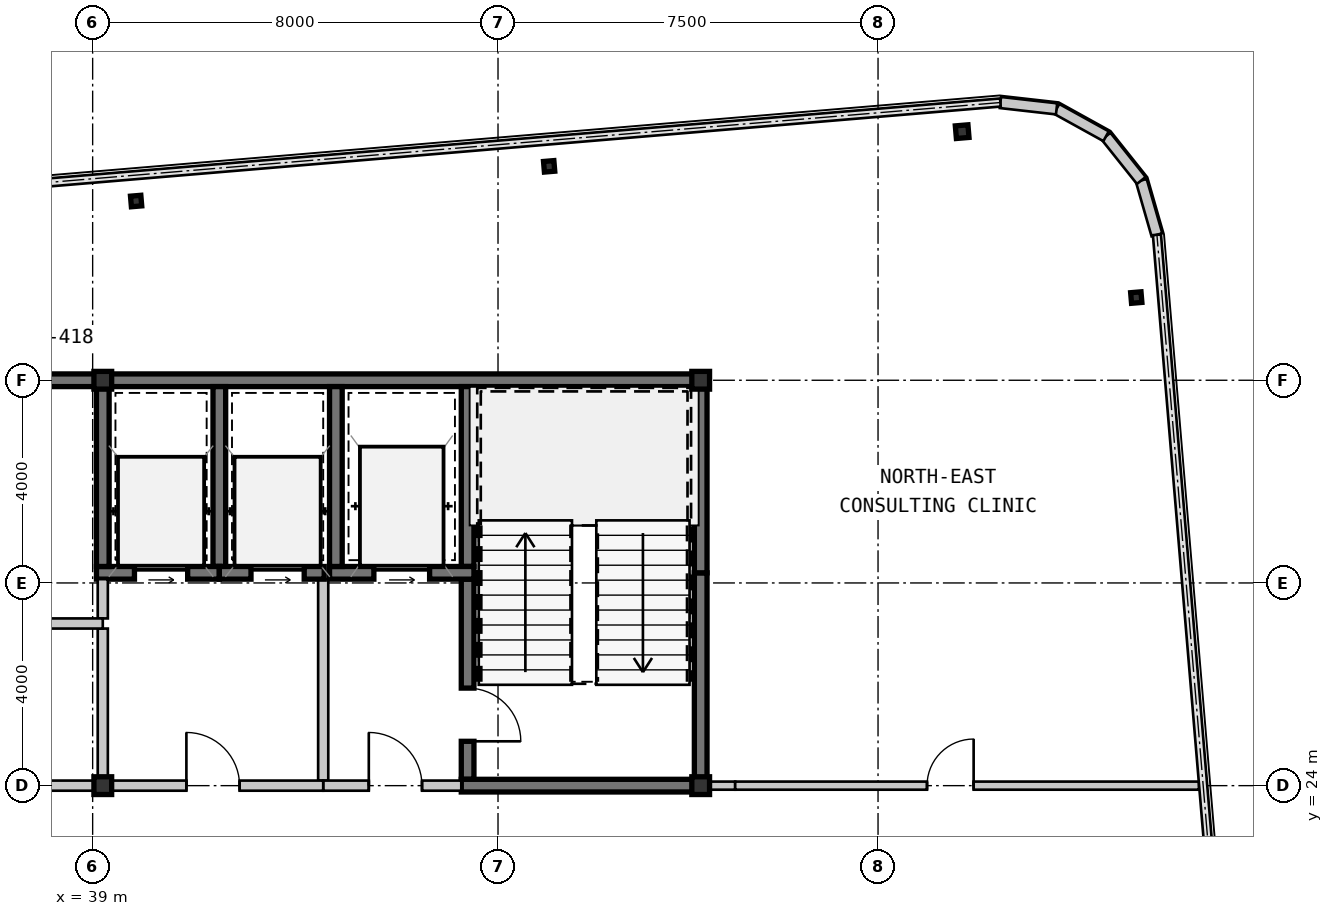
"""IFC4 building model, lengths in metres.
Left out: names, types, materials, properties, quantities, classifications, styles, units other than length and angle.
Written with IfcOpenShell. Run it as: python <this file> out.ifc"""

import sys

from ifc_helpers import new_model, si_unit, direction, frame, frame_2d, origin, origin_2d, place, context, subcontext, project, spatial, rectangle, hollow_rectangle, i_section, extrude, source, transform, mapped, element, fill, save


model = new_model("IFC4")
c1 = context("Model", 3, precision=1e-05, world=origin(), true_north=direction((0.0, 1.0)))
c2 = subcontext(c1, "Body", "Model", "MODEL_VIEW")
j1 = project(units=[si_unit("LENGTHUNIT", "METRE"), si_unit("PLANEANGLEUNIT", "RADIAN")], contexts=[c1])
p1 = place(None, origin())
s1 = spatial("IfcSite", under=j1, at=p1, CompositionType="ELEMENT")
p2 = place(p1, origin())
s2 = spatial("IfcBuilding", under=s1, at=p2, CompositionType="ELEMENT")
p3 = place(p2, frame((0.0, 0.0, 191.45)))
s3 = spatial("IfcBuildingStorey", under=s2, at=p3, CompositionType="ELEMENT", Elevation=191.45)
m1 = source(origin(), c2, "Body", "SweptSolid", [
    extrude(hollow_rectangle(XDim=0.35, YDim=0.35, WallThickness=0.016, at=origin_2d()), origin(), (0.0, 0.0, 1.0), 3.15),
])
for number, where, z_axis, x_axis in (
    (1, (39.2, 24.0, 0.0), (0.0, 0.0, 1.0), (1.0, 0.0, 0.0)),
    (2, (51.0, 24.0, 0.0), (0.0, 0.0, 1.0), (1.0, 0.0, 0.0)),
    (3, (39.2, 32.0, 0.0), (0.0, 0.0, 1.0), (1.0, 0.0, 0.0)),
    (4, (51.0, 32.0, 0.0), (0.0, 0.0, 1.0), (1.0, 0.0, 0.0)),
):
    element("IfcColumn", number, at=place(p3, frame(where, z_axis=z_axis, x_axis=x_axis)), inside=s3, PredefinedType="COLUMN", context=c2, shape_type="MappedRepresentation", body=[
        mapped(m1, transform((0.0, 0.0, 0.0), scale=1.0)),
    ])
m2 = source(origin(), c2, "Body", "SweptSolid", [
    extrude(i_section(OverallWidth=0.205, OverallDepth=0.21, WebThickness=0.009, FlangeThickness=0.014, at=origin_2d()), origin(), (0.0, 0.0, 1.0), 3.15),
])
for number, where, z_axis, x_axis in (
    (5, (39.858, 35.537, 0.0), (0.0, 0.0, 1.0), (0.996, 0.084, 0.0)),
    (6, (48.009, 36.221, 0.0), (0.0, 0.0, 1.0), (0.996, 0.084, 0.0)),
):
    element("IfcColumn", number, at=place(p3, frame(where, z_axis=z_axis, x_axis=x_axis)), inside=s3, PredefinedType="COLUMN", context=c2, shape_type="MappedRepresentation", body=[
        mapped(m2, transform((0.0, 0.0, 0.0), scale=1.0)),
    ])
m3 = source(origin(), c2, "Body", "SweptSolid", [
    extrude(hollow_rectangle(XDim=0.25, YDim=0.25, WallThickness=0.01, at=origin_2d()), origin(), (0.0, 0.0, 1.0), 3.15),
])
p4 = place(p3, frame((56.16, 36.906, 0.0), z_axis=(0.0, 0.0, 1.0), x_axis=(0.99649285925, 0.083677843332, 0.0)))
e7 = element("IfcColumn", 7, at=p4, inside=s3, PredefinedType="COLUMN", context=c2, shape_type="MappedRepresentation", body=[
    mapped(m3, transform((0.0, 0.0, 0.0), scale=1.0)),
])
p5 = place(p3, frame((59.596, 33.632, 0.0), z_axis=(0.0, 0.0, 1.0), x_axis=(0.99649285925, 0.083677843332, 0.0)))
e8 = element("IfcColumn", 8, at=p5, inside=s3, PredefinedType="COLUMN", context=c2, shape_type="MappedRepresentation", body=[
    mapped(m2, transform((0.0, 0.0, 0.0), scale=1.0)),
])
m4 = source(origin(), c2, "Body", "SweptSolid", [
    extrude(rectangle(XDim=1.116, YDim=0.22, at=frame_2d((0.558, 0.0))), origin(), (0.0, 0.0, 1.0), 2.93),
])
for number, where, z_axis, x_axis in (
    (9, (60.004, 34.87, 0.0), (0.0, 0.0, 1.0), (-0.277, 0.961, 0.0)),
    (10, (59.696, 35.943, 0.0), (0.0, 0.0, 1.0), (-0.623, 0.782, 0.0)),
    (11, (59.0, 36.816, 0.0), (0.0, 0.0, 1.0), (-0.875, 0.484, 0.0)),
    (12, (58.024, 37.356, 0.0), (0.0, 0.0, 1.0), (-0.994, 0.112, 0.0)),
):
    element("IfcWall", number, at=place(p3, frame(where, z_axis=z_axis, x_axis=x_axis)), inside=s3, PredefinedType="SOLIDWALL", context=c2, shape_type="MappedRepresentation", body=[
        mapped(m4, transform((0.0, 0.0, 0.0), scale=1.0)),
    ])
m5 = source(origin(), c2, "Body", "SweptSolid", [
    extrude(rectangle(XDim=11.2, YDim=0.25, at=frame_2d((5.6, 0.0))), origin(), (0.0, 0.0, 1.0), 2.93),
])
p6 = place(p3, frame((28.0, 32.0, 0.0), z_axis=(0.0, 0.0, 1.0), x_axis=(1.0, 0.0, 0.0)))
e13 = element("IfcWall", 13, at=p6, inside=s3, PredefinedType="SHEAR", context=c2, shape_type="MappedRepresentation", body=[
    mapped(m5, transform((0.0, 0.0, 0.0), scale=1.0)),
])
m6 = source(origin(), c2, "Body", "SweptSolid", [
    extrude(rectangle(XDim=11.925, YDim=0.25, at=frame_2d((5.962, 0.0))), origin(), (0.0, 0.0, 1.0), 2.93),
])
p7 = place(p3, frame((39.2, 32.0, 0.0), z_axis=(0.0, 0.0, 1.0), x_axis=(1.0, 0.0, 0.0)))
e14 = element("IfcWall", 14, at=p7, inside=s3, PredefinedType="SHEAR", context=c2, shape_type="MappedRepresentation", body=[
    mapped(m6, transform((0.0, 0.0, 0.0), scale=1.0)),
])
m7 = source(origin(), c2, "Body", "SweptSolid", [
    extrude(rectangle(XDim=4.075, YDim=0.25, at=frame_2d((2.038, 0.0))), origin(), (0.0, 0.0, 1.0), 2.93),
])
p8 = place(p3, frame((51.0, 24.125, 0.0), z_axis=(0.0, 0.0, 1.0), x_axis=(0.0, 1.0, 0.0)))
e15 = element("IfcWall", 15, at=p8, inside=s3, PredefinedType="SHEAR", context=c2, shape_type="MappedRepresentation", body=[
    mapped(m7, transform((0.0, 0.0, 0.0), scale=1.0)),
])
m8 = source(origin(), c2, "Body", "SweptSolid", [
    extrude(rectangle(XDim=3.675, YDim=0.25, at=frame_2d((1.837, 0.0))), origin(), (0.0, 0.0, 1.0), 2.93),
])
p9 = place(p3, frame((51.0, 28.2, 0.0), z_axis=(0.0, 0.0, 1.0), x_axis=(0.0, 1.0, 0.0)))
e16 = element("IfcWall", 16, at=p9, inside=s3, PredefinedType="SHEAR", context=c2, shape_type="MappedRepresentation", body=[
    mapped(m8, transform((0.0, 0.0, 0.0), scale=1.0)),
])
m9 = source(origin(), c2, "Body", "SweptSolid", [
    extrude(rectangle(XDim=3.55, YDim=0.25, at=frame_2d((1.775, 0.0))), origin(), (0.0, 0.0, 1.0), 2.93),
])
p10 = place(p3, frame((46.4, 31.875, 0.0), z_axis=(0.0, 0.0, 1.0), x_axis=(0.0, -1.0, 0.0)))
e17 = element("IfcWall", 17, at=p10, inside=s3, PredefinedType="SHEAR", context=c2, shape_type="MappedRepresentation", body=[
    mapped(m9, transform((0.0, 0.0, 0.0), scale=1.0)),
])
m10 = source(origin(), c2, "Body", "SweptSolid", [
    extrude(rectangle(XDim=3.95, YDim=0.25, at=frame_2d((1.975, 0.0))), origin(), (0.0, 0.0, 1.0), 2.93),
])
p11 = place(p3, frame((46.4, 28.075, 0.0), z_axis=(0.0, 0.0, 1.0), x_axis=(0.0, -1.0, 0.0)))
e18 = element("IfcWall", 18, at=p11, inside=s3, PredefinedType="SHEAR", context=c2, shape_type="MappedRepresentation", body=[
    mapped(m10, transform((0.0, 0.0, 0.0), scale=1.0)),
])
m11 = source(origin(), c2, "Body", "SweptSolid", [
    extrude(rectangle(XDim=1.05, YDim=2.1, at=frame_2d((0.525, 1.05))), frame((0.0, 0.135, 0.0), z_axis=(0.0, -1.0, 0.0), x_axis=(1.0, 0.0, 0.0)), (0.0, 0.0, 1.0), 0.27),
])
p12 = place(p11, frame((2.15, 0.0, 0.0)))
e19 = element("IfcOpeningElement", 19, at=p12, cuts=e18, PredefinedType="OPENING", context=c2, shape_type="MappedRepresentation", body=[
    mapped(m11, transform((0.0, 0.0, 0.0), scale=1.0)),
])
m12 = source(origin(), c2, "Body", "SweptSolid", [
    extrude(rectangle(XDim=4.85, YDim=0.25, at=frame_2d((2.425, 0.0))), origin(), (0.0, 0.0, 1.0), 2.93),
])
p13 = place(p3, frame((46.275, 24.0, 0.0), z_axis=(0.0, 0.0, 1.0), x_axis=(1.0, 0.0, 0.0)))
e20 = element("IfcWall", 20, at=p13, inside=s3, PredefinedType="SHEAR", context=c2, shape_type="MappedRepresentation", body=[
    mapped(m12, transform((0.0, 0.0, 0.0), scale=1.0)),
])
m13 = source(origin(), c2, "Body", "SweptSolid", [
    extrude(rectangle(XDim=2.85, YDim=0.25, at=frame_2d((1.425, 0.0))), origin(), (0.0, 0.0, 1.0), 2.93),
])
p14 = place(p3, frame((43.675, 28.2, 0.0), z_axis=(0.0, 0.0, 1.0), x_axis=(1.0, 0.0, 0.0)))
e21 = element("IfcWall", 21, at=p14, inside=s3, PredefinedType="SHEAR", context=c2, shape_type="MappedRepresentation", body=[
    mapped(m13, transform((0.0, 0.0, 0.0), scale=1.0)),
])
m14 = source(origin(), c2, "Body", "SweptSolid", [
    extrude(rectangle(XDim=1.1, YDim=2.15, at=frame_2d((0.55, 1.075))), frame((0.0, 0.135, 0.0), z_axis=(0.0, -1.0, 0.0), x_axis=(1.0, 0.0, 0.0)), (0.0, 0.0, 1.0), 0.27),
])
p15 = place(p14, frame((0.875, 0.0, 0.0)))
e22 = element("IfcOpeningElement", 22, at=p15, cuts=e21, PredefinedType="OPENING", context=c2, shape_type="MappedRepresentation", body=[
    mapped(m14, transform((0.0, 0.0, 0.0), scale=1.0)),
])
p16 = place(p3, frame((43.8, 31.875, 0.0), z_axis=(0.0, 0.0, 1.0), x_axis=(0.0, -1.0, 0.0)))
e23 = element("IfcWall", 23, at=p16, inside=s3, PredefinedType="SHEAR", context=c2, shape_type="MappedRepresentation", body=[
    mapped(m9, transform((0.0, 0.0, 0.0), scale=1.0)),
])
m15 = source(origin(), c2, "Body", "SweptSolid", [
    extrude(rectangle(XDim=3.975, YDim=0.2, at=frame_2d((1.987, 0.0))), origin(), (0.0, 0.0, 1.0), 2.93),
])
p17 = place(p3, frame((43.55, 28.075, 0.0), z_axis=(0.0, 0.0, 1.0), x_axis=(0.0, -1.0, 0.0)))
e24 = element("IfcWall", 24, at=p17, inside=s3, PredefinedType="SOLIDWALL", context=c2, shape_type="MappedRepresentation", body=[
    mapped(m15, transform((0.0, 0.0, 0.0), scale=1.0)),
])
m16 = source(origin(), c2, "Body", "SweptSolid", [
    extrude(rectangle(XDim=2.725, YDim=0.2, at=frame_2d((1.362, 0.0))), origin(), (0.0, 0.0, 1.0), 2.397),
])
p18 = place(p3, frame((43.55, 24.0, 0.0), z_axis=(0.0, 0.0, 1.0), x_axis=(1.0, 0.0, 0.0)))
e25 = element("IfcWall", 25, at=p18, inside=s3, PredefinedType="SOLIDWALL", context=c2, shape_type="MappedRepresentation", body=[
    mapped(m16, transform((0.0, 0.0, 0.0), scale=1.0)),
])
m17 = source(origin(), c2, "Body", "SweptSolid", [
    extrude(rectangle(XDim=1.05, YDim=2.1, at=frame_2d((0.525, 1.05))), frame((0.0, 0.11, 0.0), z_axis=(0.0, -1.0, 0.0), x_axis=(1.0, 0.0, 0.0)), (0.0, 0.0, 1.0), 0.22),
])
p19 = place(p18, frame((0.9, 0.0, 0.0)))
e26 = element("IfcOpeningElement", 26, at=p19, cuts=e25, PredefinedType="OPENING", context=c2, shape_type="MappedRepresentation", body=[
    mapped(m17, transform((0.0, 0.0, 0.0), scale=1.0)),
])
p20 = place(p3, frame((41.5, 28.325, 0.0), z_axis=(0.0, 0.0, 1.0), x_axis=(0.0, 1.0, 0.0)))
e27 = element("IfcWall", 27, at=p20, inside=s3, PredefinedType="SHEAR", context=c2, shape_type="MappedRepresentation", body=[
    mapped(m9, transform((0.0, 0.0, 0.0), scale=1.0)),
])
m18 = source(origin(), c2, "Body", "SweptSolid", [
    extrude(rectangle(XDim=2.425, YDim=0.25, at=frame_2d((1.212, 0.0))), origin(), (0.0, 0.0, 1.0), 2.93),
])
p21 = place(p3, frame((39.075, 28.2, 0.0), z_axis=(0.0, 0.0, 1.0), x_axis=(1.0, 0.0, 0.0)))
e28 = element("IfcWall", 28, at=p21, inside=s3, PredefinedType="SHEAR", context=c2, shape_type="MappedRepresentation", body=[
    mapped(m18, transform((0.0, 0.0, 0.0), scale=1.0)),
])
m19 = source(origin(), c2, "Body", "SweptSolid", [
    extrude(rectangle(XDim=1.05, YDim=2.15, at=frame_2d((0.525, 1.075))), frame((0.0, 0.135, 0.0), z_axis=(0.0, -1.0, 0.0), x_axis=(1.0, 0.0, 0.0)), (0.0, 0.0, 1.0), 0.27),
])
p22 = place(p21, frame((0.75, 0.0, 0.0)))
e29 = element("IfcOpeningElement", 29, at=p22, cuts=e28, PredefinedType="OPENING", context=c2, shape_type="MappedRepresentation", body=[
    mapped(m19, transform((0.0, 0.0, 0.0), scale=1.0)),
])
p23 = place(p3, frame((39.2, 31.875, 0.0), z_axis=(0.0, 0.0, 1.0), x_axis=(0.0, -1.0, 0.0)))
e30 = element("IfcWall", 30, at=p23, inside=s3, PredefinedType="SHEAR", context=c2, shape_type="MappedRepresentation", body=[
    mapped(m9, transform((0.0, 0.0, 0.0), scale=1.0)),
])
m20 = source(origin(), c2, "Body", "SweptSolid", [
    extrude(rectangle(XDim=2.07, YDim=0.25, at=frame_2d((1.035, 0.0))), origin(), (0.0, 0.0, 1.0), 2.93),
])
p24 = place(p3, frame((41.5, 28.2, 0.0), z_axis=(0.0, 0.0, 1.0), x_axis=(1.0, 0.0, 0.0)))
e31 = element("IfcWall", 31, at=p24, inside=s3, PredefinedType="SHEAR", context=c2, shape_type="MappedRepresentation", body=[
    mapped(m20, transform((0.0, 0.0, 0.0), scale=1.0)),
])
p25 = place(p24, frame((0.625, 0.0, 0.0)))
e32 = element("IfcOpeningElement", 32, at=p25, cuts=e31, PredefinedType="OPENING", context=c2, shape_type="MappedRepresentation", body=[
    mapped(m19, transform((0.0, 0.0, 0.0), scale=1.0)),
])
m21 = source(origin(), c2, "Body", "SweptSolid", [
    extrude(rectangle(XDim=3.0, YDim=0.2, at=frame_2d((1.5, 0.0))), origin(), (0.0, 0.0, 1.0), 2.47),
])
p26 = place(p3, frame((39.2, 24.1, 0.0), z_axis=(0.0, 0.0, 1.0), x_axis=(0.0, 1.0, 0.0)))
e33 = element("IfcWall", 33, at=p26, inside=s3, PredefinedType="SOLIDWALL", context=c2, shape_type="MappedRepresentation", body=[
    mapped(m21, transform((0.0, 0.0, 0.0), scale=1.0)),
])
m22 = source(origin(), c2, "Body", "SweptSolid", [
    extrude(rectangle(XDim=0.775, YDim=0.2, at=frame_2d((0.387, 0.0))), origin(), (0.0, 0.0, 1.0), 2.47),
])
p27 = place(p3, frame((39.2, 27.3, 0.0), z_axis=(0.0, 0.0, 1.0), x_axis=(0.0, 1.0, 0.0)))
e34 = element("IfcWall", 34, at=p27, inside=s3, PredefinedType="SOLIDWALL", context=c2, shape_type="MappedRepresentation", body=[
    mapped(m22, transform((0.0, 0.0, 0.0), scale=1.0)),
])
m23 = source(origin(), c2, "Body", "SweptSolid", [
    extrude(rectangle(XDim=4.35, YDim=0.2, at=frame_2d((2.175, 0.0))), origin(), (0.0, 0.0, 1.0), 2.397),
])
p28 = place(p3, frame((43.55, 24.0, 0.0), z_axis=(0.0, 0.0, 1.0), x_axis=(-1.0, 0.0, 0.0)))
e35 = element("IfcWall", 35, at=p28, inside=s3, PredefinedType="SOLIDWALL", context=c2, shape_type="MappedRepresentation", body=[
    mapped(m23, transform((0.0, 0.0, 0.0), scale=1.0)),
])
p29 = place(p28, frame((1.65, 0.0, 0.0)))
e36 = element("IfcOpeningElement", 36, at=p29, cuts=e35, PredefinedType="OPENING", context=c2, shape_type="MappedRepresentation", body=[
    mapped(m17, transform((0.0, 0.0, 0.0), scale=1.0)),
])
m24 = source(origin(), c2, "Body", "SweptSolid", [
    extrude(rectangle(XDim=4.05, YDim=0.2, at=frame_2d((2.025, 0.0))), origin(), (0.0, 0.0, 1.0), 2.93),
])
p30 = place(p3, frame((35.15, 27.2, 0.0), z_axis=(0.0, 0.0, 1.0), x_axis=(1.0, 0.0, 0.0)))
e37 = element("IfcWall", 37, at=p30, inside=s3, PredefinedType="SOLIDWALL", context=c2, shape_type="MappedRepresentation", body=[
    mapped(m24, transform((0.0, 0.0, 0.0), scale=1.0)),
])
p31 = place(p30, frame((0.42, 0.0, 0.0)))
e38 = element("IfcOpeningElement", 38, at=p31, cuts=e37, PredefinedType="OPENING", context=c2, shape_type="MappedRepresentation", body=[
    mapped(m17, transform((0.0, 0.0, 0.0), scale=1.0)),
])
m25 = source(origin(), c2, "Body", "SweptSolid", [
    extrude(rectangle(XDim=4.05, YDim=0.2, at=frame_2d((2.025, 0.0))), origin(), (0.0, 0.0, 1.0), 2.47),
])
p32 = place(p3, frame((39.2, 24.0, 0.0), z_axis=(0.0, 0.0, 1.0), x_axis=(-1.0, 0.0, 0.0)))
e39 = element("IfcWall", 39, at=p32, inside=s3, PredefinedType="SOLIDWALL", context=c2, shape_type="MappedRepresentation", body=[
    mapped(m25, transform((0.0, 0.0, 0.0), scale=1.0)),
])
p33 = place(p32, frame((1.5, 0.0, 0.0)))
e40 = element("IfcOpeningElement", 40, at=p33, cuts=e39, PredefinedType="OPENING", context=c2, shape_type="MappedRepresentation", body=[
    mapped(m17, transform((0.0, 0.0, 0.0), scale=1.0)),
])
m26 = source(origin(), c2, "Body", "SweptSolid", [
    extrude(rectangle(XDim=0.556, YDim=0.16, at=frame_2d((0.278, 0.0))), origin(), (0.0, 0.0, 1.0), 2.47),
])
p34 = place(p3, frame((51.125, 24.0, 0.0), z_axis=(0.0, 0.0, 1.0), x_axis=(1.0, 0.0, 0.0)))
e41 = element("IfcWall", 41, at=p34, inside=s3, PredefinedType="PARTITIONING", context=c2, shape_type="MappedRepresentation", body=[
    mapped(m26, transform((0.0, 0.0, 0.0), scale=1.0)),
])
m27 = source(origin(), c2, "Body", "SweptSolid", [
    extrude(rectangle(XDim=9.153, YDim=0.16, at=frame_2d((4.576, 0.0))), origin(), (0.0, 0.0, 1.0), 2.93),
])
p35 = place(p3, frame((51.681, 24.0, 0.0), z_axis=(0.0, 0.0, 1.0), x_axis=(1.0, 0.0, 0.0)))
e42 = element("IfcWall", 42, at=p35, inside=s3, PredefinedType="PARTITIONING", context=c2, shape_type="MappedRepresentation", body=[
    mapped(m27, transform((0.0, 0.0, 0.0), scale=1.0)),
])
m28 = source(origin(), c2, "Body", "SweptSolid", [
    extrude(rectangle(XDim=0.92, YDim=2.1, at=frame_2d((0.46, 1.05))), frame((0.0, 0.09, 0.0), z_axis=(0.0, -1.0, 0.0), x_axis=(1.0, 0.0, 0.0)), (0.0, 0.0, 1.0), 0.18),
])
p36 = place(p35, frame((3.786, 0.0, 0.0)))
e43 = element("IfcOpeningElement", 43, at=p36, cuts=e42, PredefinedType="OPENING", context=c2, shape_type="MappedRepresentation", body=[
    mapped(m28, transform((0.0, 0.0, 0.0), scale=1.0)),
])
m29 = source(origin(), c2, "Body", "SweptSolid", [
    extrude(rectangle(XDim=1.05, YDim=2.1, at=frame_2d((0.525, 1.05))), frame((0.0, 0.025, 0.0), z_axis=(0.0, -1.0, 0.0), x_axis=(1.0, 0.0, 0.0)), (0.0, 0.0, 1.0), 0.05),
])
p37 = place(p12, origin())
e44 = element("IfcDoor", 44, at=p37, inside=s3, OperationType="SINGLE_SWING_RIGHT", PredefinedType="DOOR", context=c2, shape_type="MappedRepresentation", body=[
    mapped(m29, transform((0.0, 0.0, 0.0), scale=1.0)),
])
fill(e19, e44)
m30 = source(origin(), c2, "Body", "SweptSolid", [
    extrude(rectangle(XDim=1.1, YDim=2.15, at=frame_2d((0.55, 1.075))), frame((0.0, 0.025, 0.0), z_axis=(0.0, -1.0, 0.0), x_axis=(1.0, 0.0, 0.0)), (0.0, 0.0, 1.0), 0.05),
])
p38 = place(p15, origin())
e45 = element("IfcDoor", 45, at=p38, inside=s3, OperationType="SLIDING_TO_LEFT", PredefinedType="DOOR", context=c2, shape_type="MappedRepresentation", body=[
    mapped(m30, transform((0.0, 0.0, 0.0), scale=1.0)),
])
fill(e22, e45)
p39 = place(p19, origin())
e46 = element("IfcDoor", 46, at=p39, inside=s3, OperationType="SINGLE_SWING_LEFT", PredefinedType="DOOR", context=c2, shape_type="MappedRepresentation", body=[
    mapped(m29, transform((0.0, 0.0, 0.0), scale=1.0)),
])
fill(e26, e46)
m31 = source(origin(), c2, "Body", "SweptSolid", [
    extrude(rectangle(XDim=1.05, YDim=2.15, at=frame_2d((0.525, 1.075))), frame((0.0, 0.025, 0.0), z_axis=(0.0, -1.0, 0.0), x_axis=(1.0, 0.0, 0.0)), (0.0, 0.0, 1.0), 0.05),
])
p40 = place(p22, origin())
e47 = element("IfcDoor", 47, at=p40, inside=s3, OperationType="SLIDING_TO_LEFT", PredefinedType="DOOR", context=c2, shape_type="MappedRepresentation", body=[
    mapped(m31, transform((0.0, 0.0, 0.0), scale=1.0)),
])
fill(e29, e47)
p41 = place(p25, origin())
e48 = element("IfcDoor", 48, at=p41, inside=s3, OperationType="SLIDING_TO_LEFT", PredefinedType="DOOR", context=c2, shape_type="MappedRepresentation", body=[
    mapped(m31, transform((0.0, 0.0, 0.0), scale=1.0)),
])
fill(e32, e48)
p42 = place(p29, frame((1.05, 0.0, 0.0), z_axis=(0.0, 0.0, 1.0), x_axis=(-1.0, 0.0, 0.0)))
e49 = element("IfcDoor", 49, at=p42, inside=s3, OperationType="SINGLE_SWING_LEFT", PredefinedType="DOOR", context=c2, shape_type="MappedRepresentation", body=[
    mapped(m29, transform((0.0, 0.0, 0.0), scale=1.0)),
])
fill(e36, e49)
m32 = source(origin(), c2, "Body", "SweptSolid", [
    extrude(rectangle(XDim=0.92, YDim=2.1, at=frame_2d((0.46, 1.05))), frame((0.0, 0.025, 0.0), z_axis=(0.0, -1.0, 0.0), x_axis=(1.0, 0.0, 0.0)), (0.0, 0.0, 1.0), 0.05),
])
p43 = place(p36, origin())
e50 = element("IfcDoor", 50, at=p43, inside=s3, OperationType="SINGLE_SWING_RIGHT", PredefinedType="DOOR", context=c2, shape_type="MappedRepresentation", body=[
    mapped(m32, transform((0.0, 0.0, 0.0), scale=1.0)),
])
fill(e43, e50)
save(model, sys.argv[1])
